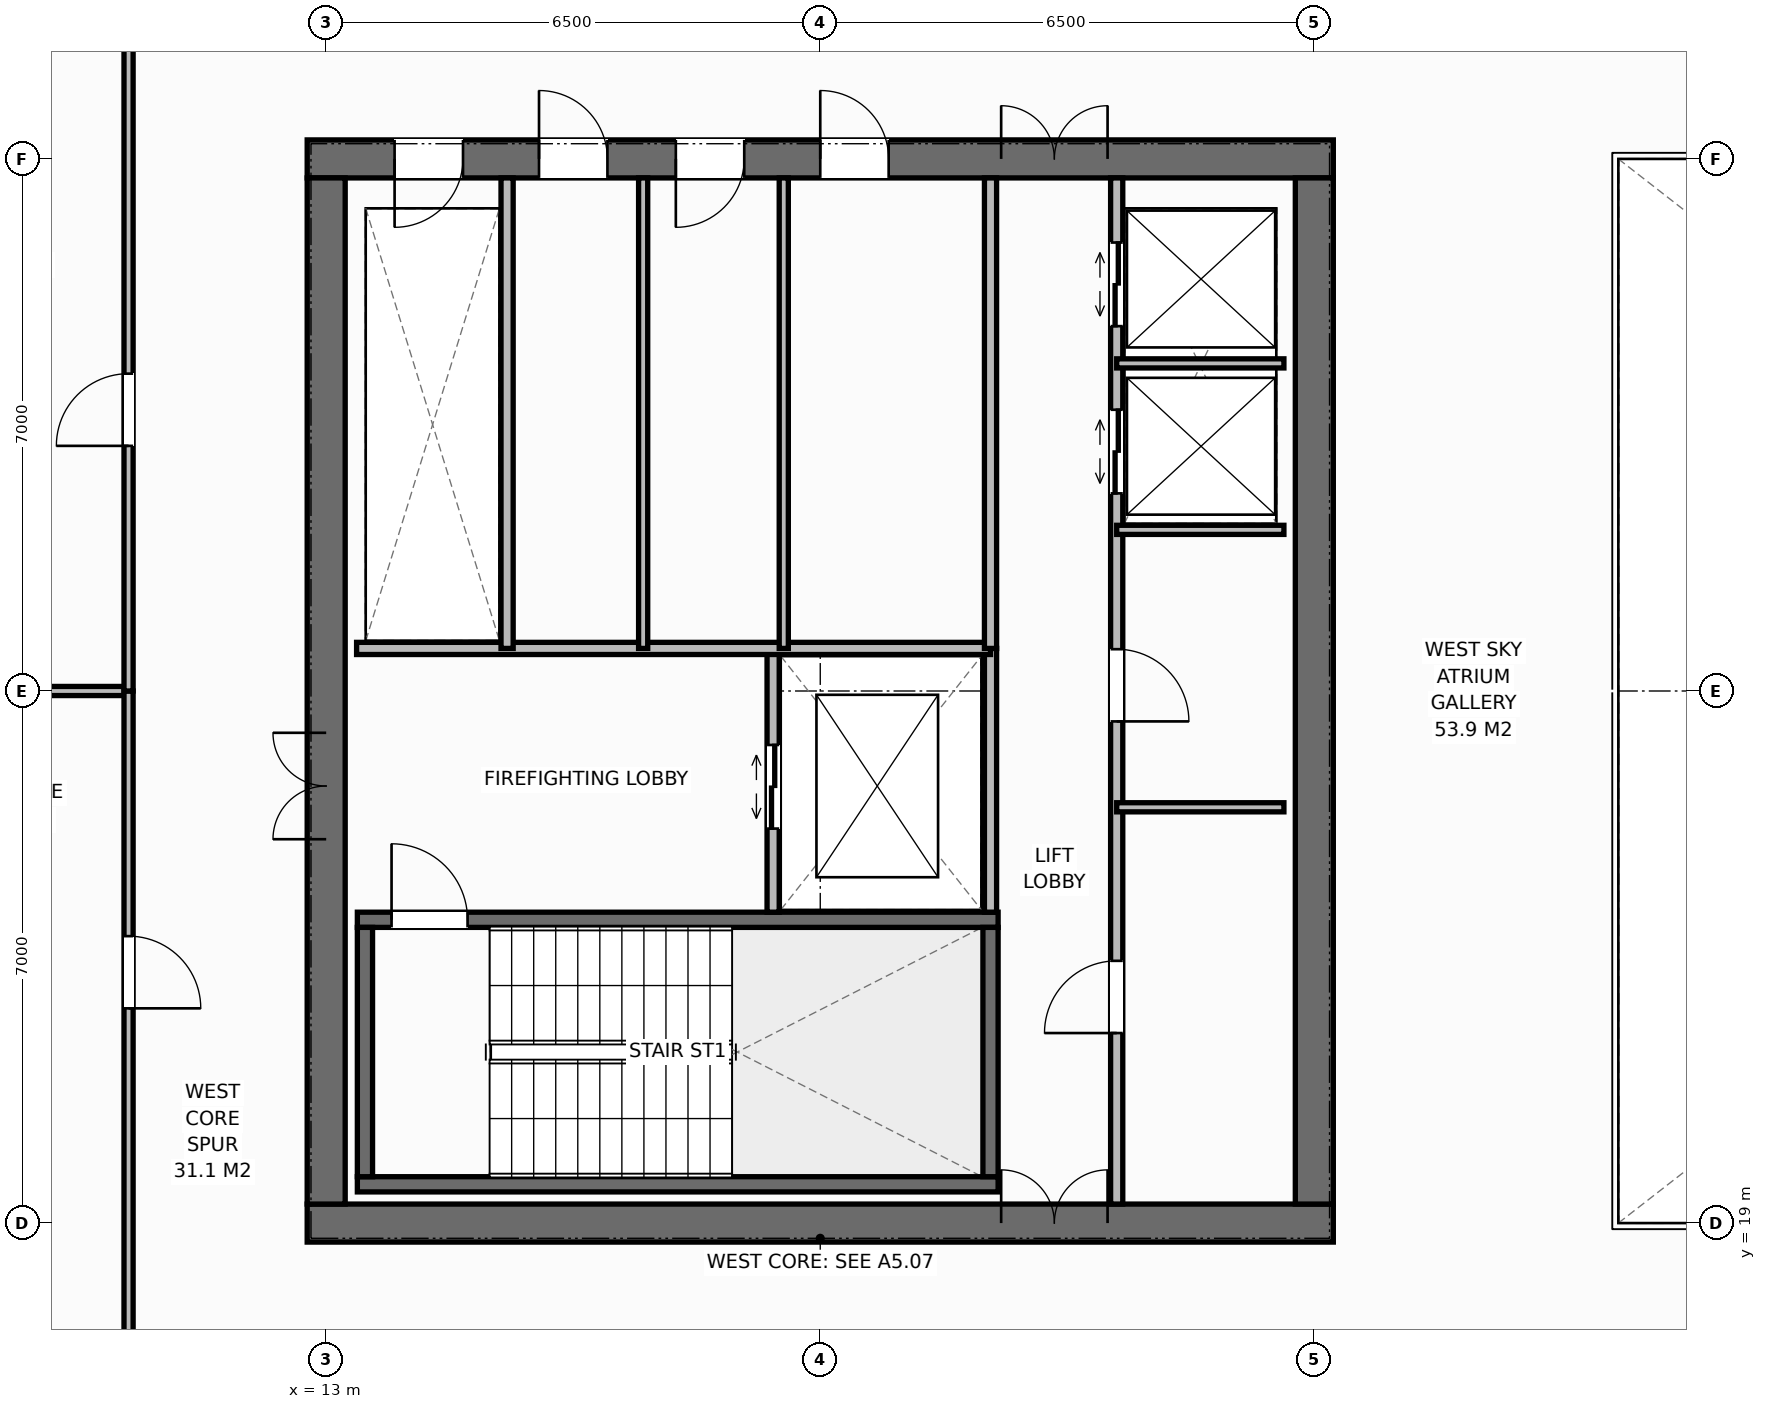
"""IFC4 building model, lengths in metres.
Left out: names, types, materials, properties, quantities, classifications, styles, units other than length and angle.
Written with IfcOpenShell. Run it as: python <this file> out.ifc"""

import sys

from ifc_helpers import new_model, si_unit, direction, frame, frame_2d, origin, place, context, subcontext, project, spatial, rectangle, extrude, element, fill, save


model = new_model("IFC4")
c1 = context("Model", 3, precision=1e-05, world=origin(), true_north=direction((0.0, 1.0)))
c2 = subcontext(c1, "Body", "Model", "MODEL_VIEW")
j1 = project(units=[si_unit("LENGTHUNIT", "METRE"), si_unit("PLANEANGLEUNIT", "RADIAN")], contexts=[c1])
p1 = place(None, origin())
s1 = spatial("IfcSite", under=j1, at=p1, CompositionType="ELEMENT")
p2 = place(p1, origin())
s2 = spatial("IfcBuilding", under=s1, at=p2, CompositionType="ELEMENT")
p3 = place(p2, frame((0.0, 0.0, 278.4)))
s3 = spatial("IfcBuildingStorey", under=s2, at=p3, CompositionType="ELEMENT", Elevation=278.4)
p4 = place(p3, frame((12.75, 19.0, 0.0), z_axis=(0.0, 0.0, 1.0), x_axis=(1.0, 0.0, 0.0)))
e1 = element("IfcWall", 1, at=p4, inside=s3, PredefinedType="SHEAR", context=c2, shape_type="SweptSolid", body=[
    extrude(rectangle(XDim=13.5, YDim=0.5, at=frame_2d((6.75, 0.0))), origin(), (0.0, 0.0, 1.0), 4.0),
])
p5 = place(p4, frame((9.13, 0.0, 0.0)))
e2 = element("IfcOpeningElement", 2, at=p5, cuts=e1, PredefinedType="OPENING", context=c2, shape_type="SweptSolid", body=[
    extrude(rectangle(XDim=1.4, YDim=2.2, at=frame_2d((0.7, 1.1))), frame((0.0, 0.26, 0.0), z_axis=(0.0, -1.0, 0.0), x_axis=(1.0, 0.0, 0.0)), (0.0, 0.0, 1.0), 0.52),
])
p6 = place(p3, frame((12.75, 33.0, 0.0), z_axis=(0.0, 0.0, 1.0), x_axis=(1.0, 0.0, 0.0)))
e3 = element("IfcWall", 3, at=p6, inside=s3, PredefinedType="SHEAR", context=c2, shape_type="SweptSolid", body=[
    extrude(rectangle(XDim=13.5, YDim=0.5, at=frame_2d((6.75, 0.0))), origin(), (0.0, 0.0, 1.0), 4.0),
])
p7 = place(p6, frame((1.15, 0.0, 0.0)))
e4 = element("IfcOpeningElement", 4, at=p7, cuts=e3, PredefinedType="OPENING", context=c2, shape_type="SweptSolid", body=[
    extrude(rectangle(XDim=0.9, YDim=2.15, at=frame_2d((0.45, 1.075))), frame((0.0, 0.26, 0.0), z_axis=(0.0, -1.0, 0.0), x_axis=(1.0, 0.0, 0.0)), (0.0, 0.0, 1.0), 0.52),
])
p8 = place(p6, frame((3.05, 0.0, 0.0)))
e5 = element("IfcOpeningElement", 5, at=p8, cuts=e3, PredefinedType="OPENING", context=c2, shape_type="SweptSolid", body=[
    extrude(rectangle(XDim=0.9, YDim=2.15, at=frame_2d((0.45, 1.075))), frame((0.0, 0.26, 0.0), z_axis=(0.0, -1.0, 0.0), x_axis=(1.0, 0.0, 0.0)), (0.0, 0.0, 1.0), 0.52),
])
p9 = place(p6, frame((4.85, 0.0, 0.0)))
e6 = element("IfcOpeningElement", 6, at=p9, cuts=e3, PredefinedType="OPENING", context=c2, shape_type="SweptSolid", body=[
    extrude(rectangle(XDim=0.9, YDim=2.15, at=frame_2d((0.45, 1.075))), frame((0.0, 0.26, 0.0), z_axis=(0.0, -1.0, 0.0), x_axis=(1.0, 0.0, 0.0)), (0.0, 0.0, 1.0), 0.52),
])
p10 = place(p6, frame((6.75, 0.0, 0.0)))
e7 = element("IfcOpeningElement", 7, at=p10, cuts=e3, PredefinedType="OPENING", context=c2, shape_type="SweptSolid", body=[
    extrude(rectangle(XDim=0.9, YDim=2.15, at=frame_2d((0.45, 1.075))), frame((0.0, 0.26, 0.0), z_axis=(0.0, -1.0, 0.0), x_axis=(1.0, 0.0, 0.0)), (0.0, 0.0, 1.0), 0.52),
])
p11 = place(p6, frame((9.13, 0.0, 0.0)))
e8 = element("IfcOpeningElement", 8, at=p11, cuts=e3, PredefinedType="OPENING", context=c2, shape_type="SweptSolid", body=[
    extrude(rectangle(XDim=1.4, YDim=2.2, at=frame_2d((0.7, 1.1))), frame((0.0, 0.26, 0.0), z_axis=(0.0, -1.0, 0.0), x_axis=(1.0, 0.0, 0.0)), (0.0, 0.0, 1.0), 0.52),
])
p12 = place(p3, frame((13.0, 19.25, 0.0), z_axis=(0.0, 0.0, 1.0), x_axis=(0.0, 1.0, 0.0)))
e9 = element("IfcWall", 9, at=p12, inside=s3, PredefinedType="SHEAR", context=c2, shape_type="SweptSolid", body=[
    extrude(rectangle(XDim=13.5, YDim=0.5, at=frame_2d((6.75, 0.0))), origin(), (0.0, 0.0, 1.0), 4.0),
])
p13 = place(p12, frame((4.8, 0.0, 0.0)))
e10 = element("IfcOpeningElement", 10, at=p13, cuts=e9, PredefinedType="OPENING", context=c2, shape_type="SweptSolid", body=[
    extrude(rectangle(XDim=1.4, YDim=2.2, at=frame_2d((0.7, 1.1))), frame((0.0, 0.26, 0.0), z_axis=(0.0, -1.0, 0.0), x_axis=(1.0, 0.0, 0.0)), (0.0, 0.0, 1.0), 0.52),
])
p14 = place(p3, frame((26.0, 19.25, 0.0), z_axis=(0.0, 0.0, 1.0), x_axis=(0.0, 1.0, 0.0)))
e11 = element("IfcWall", 11, at=p14, inside=s3, PredefinedType="SHEAR", context=c2, shape_type="SweptSolid", body=[
    extrude(rectangle(XDim=13.5, YDim=0.5, at=frame_2d((6.75, 0.0))), origin(), (0.0, 0.0, 1.0), 4.0),
])
p15 = place(p3, frame((13.41, 19.51, 0.0), z_axis=(0.0, 0.0, 1.0), x_axis=(1.0, 0.0, 0.0)))
e12 = element("IfcWall", 12, at=p15, inside=s3, PredefinedType="SHEAR", context=c2, shape_type="SweptSolid", body=[
    extrude(rectangle(XDim=8.43, YDim=0.2, at=frame_2d((4.215, 0.0))), origin(), (0.0, 0.0, 1.0), 4.0),
])
p16 = place(p3, frame((13.41, 22.99, 0.0), z_axis=(0.0, 0.0, 1.0), x_axis=(1.0, 0.0, 0.0)))
e13 = element("IfcWall", 13, at=p16, inside=s3, PredefinedType="SHEAR", context=c2, shape_type="SweptSolid", body=[
    extrude(rectangle(XDim=8.43, YDim=0.2, at=frame_2d((4.215, 0.0))), origin(), (0.0, 0.0, 1.0), 4.0),
])
p17 = place(p16, frame((0.45, 0.0, 0.0)))
e14 = element("IfcOpeningElement", 14, at=p17, cuts=e13, PredefinedType="OPENING", context=c2, shape_type="SweptSolid", body=[
    extrude(rectangle(XDim=1.0, YDim=2.15, at=frame_2d((0.5, 1.075))), frame((0.0, 0.11, 0.0), z_axis=(0.0, -1.0, 0.0), x_axis=(1.0, 0.0, 0.0)), (0.0, 0.0, 1.0), 0.22),
])
for number, where, z_axis, x_axis in (
    (15, (13.51, 19.61, 0.0), (0.0, 0.0, 1.0), (0.0, 1.0, 0.0)),
    (16, (21.74, 19.61, 0.0), (0.0, 0.0, 1.0), (0.0, 1.0, 0.0)),
):
    element("IfcWall", number, at=place(p3, frame(where, z_axis=z_axis, x_axis=x_axis)), inside=s3, PredefinedType="SHEAR", context=c2, shape_type="SweptSolid", body=[
        extrude(rectangle(XDim=3.28, YDim=0.2, at=frame_2d((1.64, 0.0))), origin(), (0.0, 0.0, 1.0), 4.0),
    ])
p18 = place(p3, frame((21.74, 23.09, 0.0), z_axis=(0.0, 0.0, 1.0), x_axis=(0.0, 1.0, 0.0)))
e17 = element("IfcWall", 17, at=p18, inside=s3, PredefinedType="STANDARD", context=c2, shape_type="SweptSolid", body=[
    extrude(rectangle(XDim=3.47, YDim=0.16, at=frame_2d((1.735, 0.0))), origin(), (0.0, 0.0, 1.0), 3.788),
])
p19 = place(p3, frame((18.88, 23.09, 0.0), z_axis=(0.0, 0.0, 1.0), x_axis=(0.0, 1.0, 0.0)))
e18 = element("IfcWall", 18, at=p19, inside=s3, PredefinedType="STANDARD", context=c2, shape_type="SweptSolid", body=[
    extrude(rectangle(XDim=3.47, YDim=0.16, at=frame_2d((1.735, 0.0))), origin(), (0.0, 0.0, 1.0), 3.788),
])
p20 = place(p19, frame((1.1, 0.0, 0.0)))
e19 = element("IfcOpeningElement", 19, at=p20, cuts=e18, PredefinedType="OPENING", context=c2, shape_type="SweptSolid", body=[
    extrude(rectangle(XDim=1.1, YDim=2.2, at=frame_2d((0.55, 1.1))), frame((0.0, 0.09, 0.0), z_axis=(0.0, -1.0, 0.0), x_axis=(1.0, 0.0, 0.0)), (0.0, 0.0, 1.0), 0.18),
])
p21 = place(p3, frame((13.4, 26.56, 0.0), z_axis=(0.0, 0.0, 1.0), x_axis=(1.0, 0.0, 0.0)))
e20 = element("IfcWall", 20, at=p21, inside=s3, PredefinedType="STANDARD", context=c2, shape_type="SweptSolid", body=[
    extrude(rectangle(XDim=8.34, YDim=0.16, at=frame_2d((4.17, 0.0))), origin(), (0.0, 0.0, 1.0), 3.788),
])
p22 = place(p3, frame((15.38, 26.56, 0.0), z_axis=(0.0, 0.0, 1.0), x_axis=(0.0, 1.0, 0.0)))
e21 = element("IfcWall", 21, at=p22, inside=s3, PredefinedType="STANDARD", context=c2, shape_type="SweptSolid", body=[
    extrude(rectangle(XDim=6.19, YDim=0.16, at=frame_2d((3.095, 0.0))), origin(), (0.0, 0.0, 1.0), 3.788),
])
for number, where, z_axis, x_axis in (
    (22, (17.17, 26.56, 0.0), (0.0, 0.0, 1.0), (0.0, 1.0, 0.0)),
    (23, (19.02, 26.56, 0.0), (0.0, 0.0, 1.0), (0.0, 1.0, 0.0)),
):
    element("IfcWall", number, at=place(p3, frame(where, z_axis=z_axis, x_axis=x_axis)), inside=s3, PredefinedType="PARTITIONING", context=c2, shape_type="SweptSolid", body=[
        extrude(rectangle(XDim=6.19, YDim=0.12, at=frame_2d((3.095, 0.0))), origin(), (0.0, 0.0, 1.0), 3.788),
    ])
p23 = place(p3, frame((21.74, 26.56, 0.0), z_axis=(0.0, 0.0, 1.0), x_axis=(0.0, 1.0, 0.0)))
e24 = element("IfcWall", 24, at=p23, inside=s3, PredefinedType="STANDARD", context=c2, shape_type="SweptSolid", body=[
    extrude(rectangle(XDim=6.19, YDim=0.16, at=frame_2d((3.095, 0.0))), origin(), (0.0, 0.0, 1.0), 3.788),
])
p24 = place(p3, frame((23.4, 19.25, 0.0), z_axis=(0.0, 0.0, 1.0), x_axis=(0.0, 1.0, 0.0)))
e25 = element("IfcWall", 25, at=p24, inside=s3, PredefinedType="STANDARD", context=c2, shape_type="SweptSolid", body=[
    extrude(rectangle(XDim=13.5, YDim=0.16, at=frame_2d((6.75, 0.0))), origin(), (0.0, 0.0, 1.0), 3.788),
])
p25 = place(p24, frame((2.25, 0.0, 0.0)))
e26 = element("IfcOpeningElement", 26, at=p25, cuts=e25, PredefinedType="OPENING", context=c2, shape_type="SweptSolid", body=[
    extrude(rectangle(XDim=0.95, YDim=2.15, at=frame_2d((0.475, 1.075))), frame((0.0, 0.09, 0.0), z_axis=(0.0, -1.0, 0.0), x_axis=(1.0, 0.0, 0.0)), (0.0, 0.0, 1.0), 0.18),
])
p26 = place(p24, frame((6.35, 0.0, 0.0)))
e27 = element("IfcOpeningElement", 27, at=p26, cuts=e25, PredefinedType="OPENING", context=c2, shape_type="SweptSolid", body=[
    extrude(rectangle(XDim=0.95, YDim=2.15, at=frame_2d((0.475, 1.075))), frame((0.0, 0.09, 0.0), z_axis=(0.0, -1.0, 0.0), x_axis=(1.0, 0.0, 0.0)), (0.0, 0.0, 1.0), 0.18),
])
p27 = place(p24, frame((9.35, 0.0, 0.0)))
e28 = element("IfcOpeningElement", 28, at=p27, cuts=e25, PredefinedType="OPENING", context=c2, shape_type="SweptSolid", body=[
    extrude(rectangle(XDim=1.1, YDim=2.2, at=frame_2d((0.55, 1.1))), frame((0.0, 0.09, 0.0), z_axis=(0.0, -1.0, 0.0), x_axis=(1.0, 0.0, 0.0)), (0.0, 0.0, 1.0), 0.18),
])
p28 = place(p24, frame((11.55, 0.0, 0.0)))
e29 = element("IfcOpeningElement", 29, at=p28, cuts=e25, PredefinedType="OPENING", context=c2, shape_type="SweptSolid", body=[
    extrude(rectangle(XDim=1.1, YDim=2.2, at=frame_2d((0.55, 1.1))), frame((0.0, 0.09, 0.0), z_axis=(0.0, -1.0, 0.0), x_axis=(1.0, 0.0, 0.0)), (0.0, 0.0, 1.0), 0.18),
])
for number, where, z_axis, x_axis in (
    (30, (23.4, 24.47, 0.0), (0.0, 0.0, 1.0), (1.0, 0.0, 0.0)),
    (31, (23.4, 28.12, 0.0), (0.0, 0.0, 1.0), (1.0, 0.0, 0.0)),
    (32, (23.4, 30.31, 0.0), (0.0, 0.0, 1.0), (1.0, 0.0, 0.0)),
):
    element("IfcWall", number, at=place(p3, frame(where, z_axis=z_axis, x_axis=x_axis)), inside=s3, PredefinedType="PARTITIONING", context=c2, shape_type="SweptSolid", body=[
        extrude(rectangle(XDim=2.2, YDim=0.12, at=frame_2d((1.1, 0.0))), origin(), (0.0, 0.0, 1.0), 3.788),
    ])
p29 = place(p3, frame((7.22, 26.0, 0.0), z_axis=(0.0, 0.0, 1.0), x_axis=(1.0, 0.0, 0.0)))
e33 = element("IfcWall", 33, at=p29, inside=s3, PredefinedType="PARTITIONING", context=c2, shape_type="SweptSolid", body=[
    extrude(rectangle(XDim=3.18, YDim=0.12, at=frame_2d((1.59, 0.0))), origin(), (0.0, 0.0, 1.0), 3.788),
])
p30 = place(p3, frame((10.4, 16.5, 0.0), z_axis=(0.0, 0.0, 1.0), x_axis=(0.0, 1.0, 0.0)))
e34 = element("IfcWall", 34, at=p30, inside=s3, PredefinedType="PARTITIONING", context=c2, shape_type="SweptSolid", body=[
    extrude(rectangle(XDim=9.5, YDim=0.12, at=frame_2d((4.75, 0.0))), origin(), (0.0, 0.0, 1.0), 3.788),
])
p31 = place(p30, frame((5.325, 0.0, 0.0)))
e35 = element("IfcOpeningElement", 35, at=p31, cuts=e34, PredefinedType="OPENING", context=c2, shape_type="SweptSolid", body=[
    extrude(rectangle(XDim=0.95, YDim=2.15, at=frame_2d((0.475, 1.075))), frame((0.0, 0.07, 0.0), z_axis=(0.0, -1.0, 0.0), x_axis=(1.0, 0.0, 0.0)), (0.0, 0.0, 1.0), 0.14),
])
p32 = place(p3, frame((10.4, 26.0, 0.0), z_axis=(0.0, 0.0, 1.0), x_axis=(0.0, 1.0, 0.0)))
e36 = element("IfcWall", 36, at=p32, inside=s3, PredefinedType="PARTITIONING", context=c2, shape_type="SweptSolid", body=[
    extrude(rectangle(XDim=9.5, YDim=0.12, at=frame_2d((4.75, 0.0))), origin(), (0.0, 0.0, 1.0), 3.788),
])
p33 = place(p32, frame((3.225, 0.0, 0.0)))
e37 = element("IfcOpeningElement", 37, at=p33, cuts=e36, PredefinedType="OPENING", context=c2, shape_type="SweptSolid", body=[
    extrude(rectangle(XDim=0.95, YDim=2.15, at=frame_2d((0.475, 1.075))), frame((0.0, 0.07, 0.0), z_axis=(0.0, -1.0, 0.0), x_axis=(1.0, 0.0, 0.0)), (0.0, 0.0, 1.0), 0.14),
])
p34 = place(p17, origin())
e38 = element("IfcDoor", 38, at=p34, inside=s3, OperationType="SINGLE_SWING_LEFT", PredefinedType="DOOR", context=c2, shape_type="SweptSolid", body=[
    extrude(rectangle(XDim=1.0, YDim=2.15, at=frame_2d((0.5, 1.075))), frame((0.0, 0.025, 0.0), z_axis=(0.0, -1.0, 0.0), x_axis=(1.0, 0.0, 0.0)), (0.0, 0.0, 1.0), 0.05),
])
fill(e14, e38)
p35 = place(p13, origin())
e39 = element("IfcDoor", 39, at=p35, inside=s3, OperationType="DOUBLE_DOOR_SINGLE_SWING", PredefinedType="DOOR", context=c2, shape_type="SweptSolid", body=[
    extrude(rectangle(XDim=1.4, YDim=2.2, at=frame_2d((0.7, 1.1))), frame((0.0, 0.025, 0.0), z_axis=(0.0, -1.0, 0.0), x_axis=(1.0, 0.0, 0.0)), (0.0, 0.0, 1.0), 0.05),
])
fill(e10, e39)
p36 = place(p20, origin())
e40 = element("IfcDoor", 40, at=p36, inside=s3, OperationType="DOUBLE_DOOR_SLIDING", PredefinedType="DOOR", context=c2, shape_type="SweptSolid", body=[
    extrude(rectangle(XDim=1.1, YDim=2.2, at=frame_2d((0.55, 1.1))), frame((0.0, 0.025, 0.0), z_axis=(0.0, -1.0, 0.0), x_axis=(1.0, 0.0, 0.0)), (0.0, 0.0, 1.0), 0.05),
])
fill(e19, e40)
p37 = place(p7, origin())
e41 = element("IfcDoor", 41, at=p37, inside=s3, OperationType="SINGLE_SWING_RIGHT", PredefinedType="DOOR", context=c2, shape_type="SweptSolid", body=[
    extrude(rectangle(XDim=0.9, YDim=2.15, at=frame_2d((0.45, 1.075))), frame((0.0, -0.025, 0.0), z_axis=(0.0, -1.0, 0.0), x_axis=(1.0, 0.0, 0.0)), (0.0, 0.0, 1.0), 0.05),
])
fill(e4, e41)
p38 = place(p8, origin())
e42 = element("IfcDoor", 42, at=p38, inside=s3, OperationType="SINGLE_SWING_LEFT", PredefinedType="DOOR", context=c2, shape_type="SweptSolid", body=[
    extrude(rectangle(XDim=0.9, YDim=2.15, at=frame_2d((0.45, 1.075))), frame((0.0, -0.025, 0.0), z_axis=(0.0, -1.0, 0.0), x_axis=(1.0, 0.0, 0.0)), (0.0, 0.0, 1.0), 0.05),
])
fill(e5, e42)
p39 = place(p9, origin())
e43 = element("IfcDoor", 43, at=p39, inside=s3, OperationType="SINGLE_SWING_RIGHT", PredefinedType="DOOR", context=c2, shape_type="SweptSolid", body=[
    extrude(rectangle(XDim=0.9, YDim=2.15, at=frame_2d((0.45, 1.075))), frame((0.0, -0.025, 0.0), z_axis=(0.0, -1.0, 0.0), x_axis=(1.0, 0.0, 0.0)), (0.0, 0.0, 1.0), 0.05),
])
fill(e6, e43)
p40 = place(p10, origin())
e44 = element("IfcDoor", 44, at=p40, inside=s3, OperationType="SINGLE_SWING_LEFT", PredefinedType="DOOR", context=c2, shape_type="SweptSolid", body=[
    extrude(rectangle(XDim=0.9, YDim=2.15, at=frame_2d((0.45, 1.075))), frame((0.0, -0.025, 0.0), z_axis=(0.0, -1.0, 0.0), x_axis=(1.0, 0.0, 0.0)), (0.0, 0.0, 1.0), 0.05),
])
fill(e7, e44)
p41 = place(p5, origin())
e45 = element("IfcDoor", 45, at=p41, inside=s3, OperationType="DOUBLE_DOOR_SINGLE_SWING", PredefinedType="DOOR", context=c2, shape_type="SweptSolid", body=[
    extrude(rectangle(XDim=1.4, YDim=2.2, at=frame_2d((0.7, 1.1))), frame((0.0, 0.075, 0.0), z_axis=(0.0, -1.0, 0.0), x_axis=(1.0, 0.0, 0.0)), (0.0, 0.0, 1.0), 0.05),
])
fill(e2, e45)
p42 = place(p11, origin())
e46 = element("IfcDoor", 46, at=p42, inside=s3, OperationType="DOUBLE_DOOR_SINGLE_SWING", PredefinedType="DOOR", context=c2, shape_type="SweptSolid", body=[
    extrude(rectangle(XDim=1.4, YDim=2.2, at=frame_2d((0.7, 1.1))), frame((0.0, -0.025, 0.0), z_axis=(0.0, -1.0, 0.0), x_axis=(1.0, 0.0, 0.0)), (0.0, 0.0, 1.0), 0.05),
])
fill(e8, e46)
p43 = place(p25, origin())
e47 = element("IfcDoor", 47, at=p43, inside=s3, OperationType="SINGLE_SWING_LEFT", PredefinedType="DOOR", context=c2, shape_type="SweptSolid", body=[
    extrude(rectangle(XDim=0.95, YDim=2.15, at=frame_2d((0.475, 1.075))), frame((0.0, 0.025, 0.0), z_axis=(0.0, -1.0, 0.0), x_axis=(1.0, 0.0, 0.0)), (0.0, 0.0, 1.0), 0.05),
])
fill(e26, e47)
p44 = place(p26, origin())
e48 = element("IfcDoor", 48, at=p44, inside=s3, OperationType="SINGLE_SWING_RIGHT", PredefinedType="DOOR", context=c2, shape_type="SweptSolid", body=[
    extrude(rectangle(XDim=0.95, YDim=2.15, at=frame_2d((0.475, 1.075))), frame((0.0, 0.025, 0.0), z_axis=(0.0, -1.0, 0.0), x_axis=(1.0, 0.0, 0.0)), (0.0, 0.0, 1.0), 0.05),
])
fill(e27, e48)
p45 = place(p27, origin())
e49 = element("IfcDoor", 49, at=p45, inside=s3, OperationType="DOUBLE_DOOR_SLIDING", PredefinedType="DOOR", context=c2, shape_type="SweptSolid", body=[
    extrude(rectangle(XDim=1.1, YDim=2.2, at=frame_2d((0.55, 1.1))), frame((0.0, 0.025, 0.0), z_axis=(0.0, -1.0, 0.0), x_axis=(1.0, 0.0, 0.0)), (0.0, 0.0, 1.0), 0.05),
])
fill(e28, e49)
p46 = place(p28, origin())
e50 = element("IfcDoor", 50, at=p46, inside=s3, OperationType="DOUBLE_DOOR_SLIDING", PredefinedType="DOOR", context=c2, shape_type="SweptSolid", body=[
    extrude(rectangle(XDim=1.1, YDim=2.2, at=frame_2d((0.55, 1.1))), frame((0.0, 0.025, 0.0), z_axis=(0.0, -1.0, 0.0), x_axis=(1.0, 0.0, 0.0)), (0.0, 0.0, 1.0), 0.05),
])
fill(e29, e50)
p47 = place(p31, origin())
e51 = element("IfcDoor", 51, at=p47, inside=s3, OperationType="SINGLE_SWING_RIGHT", PredefinedType="DOOR", context=c2, shape_type="SweptSolid", body=[
    extrude(rectangle(XDim=0.95, YDim=2.15, at=frame_2d((0.475, 1.075))), frame((0.0, 0.025, 0.0), z_axis=(0.0, -1.0, 0.0), x_axis=(1.0, 0.0, 0.0)), (0.0, 0.0, 1.0), 0.05),
])
fill(e35, e51)
p48 = place(p33, origin())
e52 = element("IfcDoor", 52, at=p48, inside=s3, OperationType="SINGLE_SWING_LEFT", PredefinedType="DOOR", context=c2, shape_type="SweptSolid", body=[
    extrude(rectangle(XDim=0.95, YDim=2.15, at=frame_2d((0.475, 1.075))), frame((0.0, 0.025, 0.0), z_axis=(0.0, -1.0, 0.0), x_axis=(1.0, 0.0, 0.0)), (0.0, 0.0, 1.0), 0.05),
])
fill(e37, e52)
save(model, sys.argv[1])
